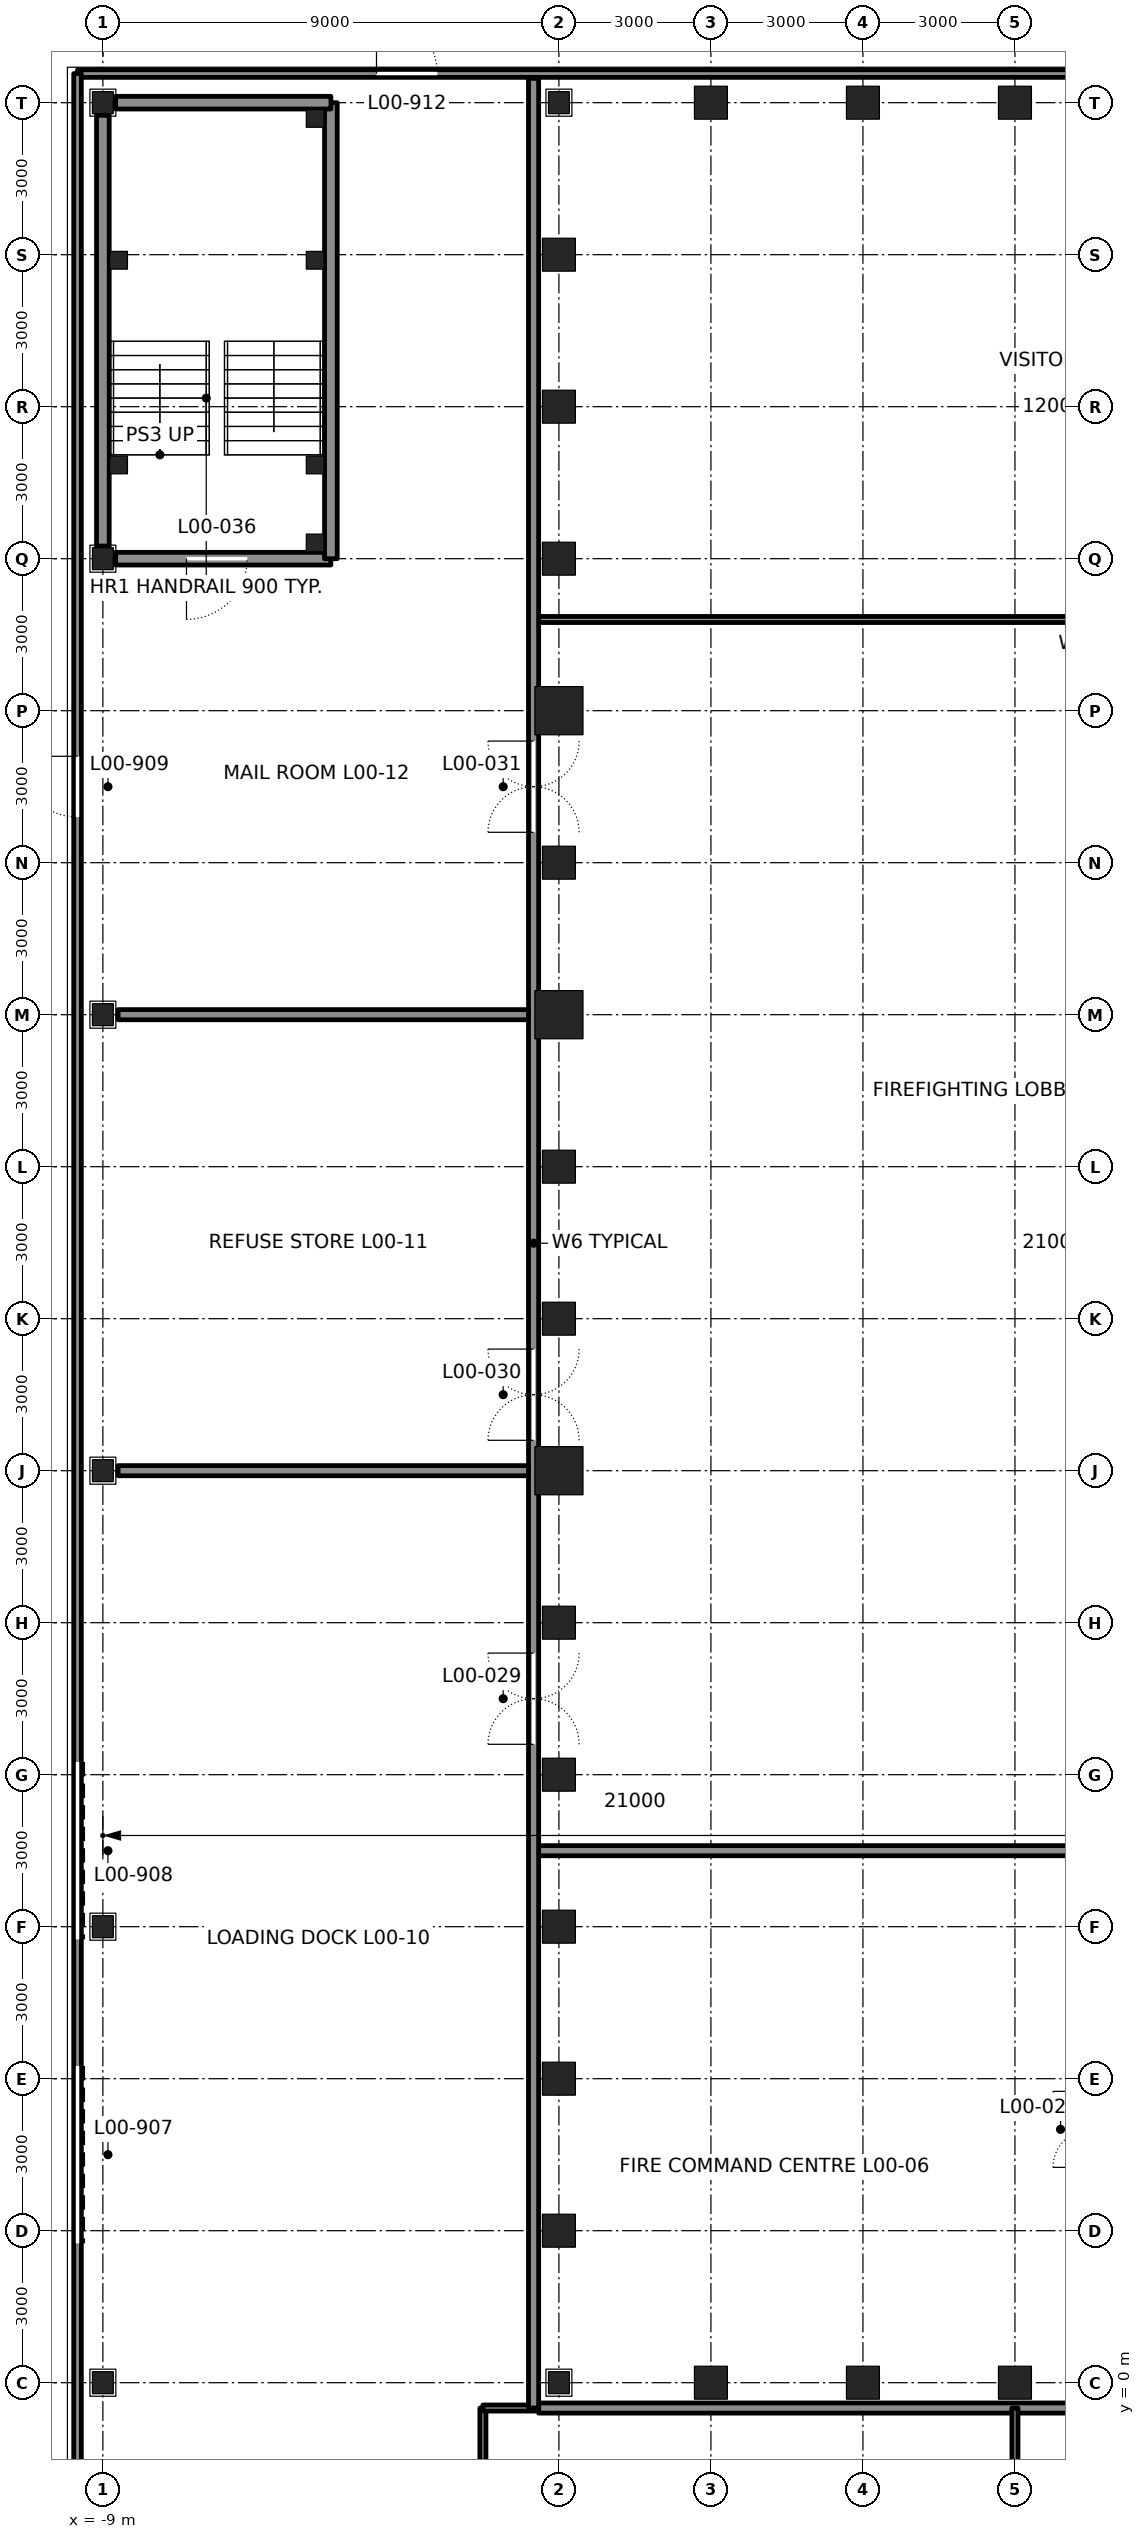
"""IFC4 building model, lengths in metres.
Left out: names, types, materials, properties, quantities, classifications, styles, units other than length and angle.
Written with IfcOpenShell. Run it as: python <this file> out.ifc"""

import sys

from ifc_helpers import new_model, si_unit, direction, frame, frame_2d, origin, origin_2d, place, context, subcontext, project, spatial, rectangle, hollow_rectangle, i_section, extrude, element, fill, save


model = new_model("IFC4")
c1 = context("Model", 3, precision=1e-05, world=origin(), true_north=direction((0.0, 1.0)))
c2 = subcontext(c1, "Body", "Model", "MODEL_VIEW")
j1 = project(units=[si_unit("LENGTHUNIT", "METRE"), si_unit("PLANEANGLEUNIT", "RADIAN")], contexts=[c1])
p1 = place(None, origin())
s1 = spatial("IfcSite", under=j1, at=p1, CompositionType="ELEMENT")
p2 = place(p1, origin())
s2 = spatial("IfcBuilding", under=s1, at=p2, CompositionType="ELEMENT")
p3 = place(p2, origin())
s3 = spatial("IfcBuildingStorey", under=s2, at=p3, CompositionType="ELEMENT", Elevation=0.0)
for number, where, z_axis, x_axis in (
    (1, (3.0, 0.0, 0.0), (0.0, 0.0, 1.0), (0.0, -1.0, 0.0)),
    (2, (6.0, 0.0, 0.0), (0.0, 0.0, 1.0), (0.0, -1.0, 0.0)),
    (3, (9.0, 0.0, 0.0), (0.0, 0.0, 1.0), (0.0, -1.0, 0.0)),
    (4, (9.0, 45.0, 0.0), (0.0, 0.0, 1.0), (0.0, 1.0, 0.0)),
    (5, (6.0, 45.0, 0.0), (0.0, 0.0, 1.0), (0.0, 1.0, 0.0)),
    (6, (3.0, 45.0, 0.0), (0.0, 0.0, 1.0), (0.0, 1.0, 0.0)),
    (7, (0.0, 42.0, 0.0), (0.0, 0.0, 1.0), (-1.0, 0.0, 0.0)),
    (8, (0.0, 39.0, 0.0), (0.0, 0.0, 1.0), (-1.0, 0.0, 0.0)),
    (9, (0.0, 36.0, 0.0), (0.0, 0.0, 1.0), (-1.0, 0.0, 0.0)),
):
    element("IfcColumn", number, at=place(p3, frame(where, z_axis=z_axis, x_axis=x_axis)), inside=s3, PredefinedType="COLUMN", context=c2, shape_type="SweptSolid", body=[
        extrude(hollow_rectangle(XDim=0.65, YDim=0.65, WallThickness=0.065, at=origin_2d()), origin(), (0.0, 0.0, 1.0), 6.0),
    ])
p4 = place(p3, frame((0.0, 33.0, 0.0), z_axis=(0.0, 0.0, 1.0), x_axis=(-1.0, 0.0, 0.0)))
e10 = element("IfcColumn", 10, at=p4, inside=s3, PredefinedType="COLUMN", context=c2, shape_type="SweptSolid", body=[
    extrude(hollow_rectangle(XDim=0.95, YDim=0.95, WallThickness=0.11, at=origin_2d()), origin(), (0.0, 0.0, 1.0), 6.0),
])
p5 = place(p3, frame((0.0, 30.0, 0.0), z_axis=(0.0, 0.0, 1.0), x_axis=(-1.0, 0.0, 0.0)))
e11 = element("IfcColumn", 11, at=p5, inside=s3, PredefinedType="COLUMN", context=c2, shape_type="SweptSolid", body=[
    extrude(hollow_rectangle(XDim=0.65, YDim=0.65, WallThickness=0.065, at=origin_2d()), origin(), (0.0, 0.0, 1.0), 6.0),
])
p6 = place(p3, frame((0.0, 27.0, 0.0), z_axis=(0.0, 0.0, 1.0), x_axis=(-1.0, 0.0, 0.0)))
e12 = element("IfcColumn", 12, at=p6, inside=s3, PredefinedType="COLUMN", context=c2, shape_type="SweptSolid", body=[
    extrude(hollow_rectangle(XDim=0.95, YDim=0.95, WallThickness=0.11, at=origin_2d()), origin(), (0.0, 0.0, 1.0), 6.0),
])
for number, where, z_axis, x_axis in (
    (13, (0.0, 24.0, 0.0), (0.0, 0.0, 1.0), (-1.0, 0.0, 0.0)),
    (14, (0.0, 21.0, 0.0), (0.0, 0.0, 1.0), (-1.0, 0.0, 0.0)),
):
    element("IfcColumn", number, at=place(p3, frame(where, z_axis=z_axis, x_axis=x_axis)), inside=s3, PredefinedType="COLUMN", context=c2, shape_type="SweptSolid", body=[
        extrude(hollow_rectangle(XDim=0.65, YDim=0.65, WallThickness=0.065, at=origin_2d()), origin(), (0.0, 0.0, 1.0), 6.0),
    ])
p7 = place(p3, frame((0.0, 18.0, 0.0), z_axis=(0.0, 0.0, 1.0), x_axis=(-1.0, 0.0, 0.0)))
e15 = element("IfcColumn", 15, at=p7, inside=s3, PredefinedType="COLUMN", context=c2, shape_type="SweptSolid", body=[
    extrude(hollow_rectangle(XDim=0.95, YDim=0.95, WallThickness=0.11, at=origin_2d()), origin(), (0.0, 0.0, 1.0), 6.0),
])
for number, where, z_axis, x_axis in (
    (16, (0.0, 15.0, 0.0), (0.0, 0.0, 1.0), (-1.0, 0.0, 0.0)),
    (17, (0.0, 12.0, 0.0), (0.0, 0.0, 1.0), (-1.0, 0.0, 0.0)),
    (18, (0.0, 9.0, 0.0), (0.0, 0.0, 1.0), (-1.0, 0.0, 0.0)),
    (19, (0.0, 6.0, 0.0), (0.0, 0.0, 1.0), (-1.0, 0.0, 0.0)),
    (20, (0.0, 3.0, 0.0), (0.0, 0.0, 1.0), (-1.0, 0.0, 0.0)),
):
    element("IfcColumn", number, at=place(p3, frame(where, z_axis=z_axis, x_axis=x_axis)), inside=s3, PredefinedType="COLUMN", context=c2, shape_type="SweptSolid", body=[
        extrude(hollow_rectangle(XDim=0.65, YDim=0.65, WallThickness=0.065, at=origin_2d()), origin(), (0.0, 0.0, 1.0), 6.0),
    ])
for number, where, z_axis, x_axis in (
    (21, (-9.0, 0.0, 0.0), (0.0, 0.0, 1.0), (1.0, 0.0, 0.0)),
    (22, (-9.0, 9.0, 0.0), (0.0, 0.0, 1.0), (1.0, 0.0, 0.0)),
    (23, (-9.0, 18.0, 0.0), (0.0, 0.0, 1.0), (1.0, 0.0, 0.0)),
    (24, (-9.0, 27.0, 0.0), (0.0, 0.0, 1.0), (1.0, 0.0, 0.0)),
    (25, (-9.0, 36.0, 0.0), (0.0, 0.0, 1.0), (1.0, 0.0, 0.0)),
    (26, (-9.0, 45.0, 0.0), (0.0, 0.0, 1.0), (1.0, 0.0, 0.0)),
    (27, (0.0, 0.0, 0.0), (0.0, 0.0, 1.0), (1.0, 0.0, 0.0)),
    (28, (0.0, 45.0, 0.0), (0.0, 0.0, 1.0), (1.0, 0.0, 0.0)),
):
    element("IfcColumn", number, at=place(p3, frame(where, z_axis=z_axis, x_axis=x_axis)), inside=s3, PredefinedType="COLUMN", context=c2, shape_type="SweptSolid", body=[
        extrude(i_section(OverallWidth=0.411, OverallDepth=0.434, WebThickness=0.036, FlangeThickness=0.057, at=origin_2d()), origin(), (0.0, 0.0, 1.0), 6.0),
    ])
p8 = place(p3, frame((54.5, 45.575, 0.0), z_axis=(0.0, 0.0, 1.0), x_axis=(-1.0, 0.0, 0.0)))
e29 = element("IfcWall", 29, at=p8, inside=s3, PredefinedType="SOLIDWALL", context=c2, shape_type="SweptSolid", body=[
    extrude(rectangle(XDim=64.0, YDim=0.15, at=frame_2d((32.0, 0.0))), origin(), (0.0, 0.0, 1.0), 5.8),
])
p9 = place(p8, frame((56.9, 0.0, 0.0)))
e30 = element("IfcOpeningElement", 30, at=p9, cuts=e29, PredefinedType="OPENING", context=c2, shape_type="SweptSolid", body=[
    extrude(rectangle(XDim=1.2, YDim=2.1, at=frame_2d((0.6, 1.05))), frame((0.0, 0.085, 0.0), z_axis=(0.0, -1.0, 0.0), x_axis=(1.0, 0.0, 0.0)), (0.0, 0.0, 1.0), 0.17),
])
p10 = place(p8, frame((5.9, 0.0, 0.0)))
e31 = element("IfcOpeningElement", 31, at=p10, cuts=e29, PredefinedType="OPENING", context=c2, shape_type="SweptSolid", body=[
    extrude(rectangle(XDim=1.2, YDim=2.1, at=frame_2d((0.6, 1.05))), frame((0.0, 0.085, 0.0), z_axis=(0.0, -1.0, 0.0), x_axis=(1.0, 0.0, 0.0)), (0.0, 0.0, 1.0), 0.17),
])
p11 = place(p3, frame((-9.5, 45.575, 0.0), z_axis=(0.0, 0.0, 1.0), x_axis=(0.0, -1.0, 0.0)))
e32 = element("IfcWall", 32, at=p11, inside=s3, PredefinedType="SOLIDWALL", context=c2, shape_type="SweptSolid", body=[
    extrude(rectangle(XDim=64.075, YDim=0.15, at=frame_2d((32.038, 0.0))), origin(), (0.0, 0.0, 1.0), 5.8),
])
p12 = place(p11, frame((39.325, 0.0, 0.0)))
e33 = element("IfcOpeningElement", 33, at=p12, cuts=e32, PredefinedType="OPENING", context=c2, shape_type="SweptSolid", body=[
    extrude(rectangle(XDim=3.5, YDim=4.0, at=frame_2d((1.75, 2.0))), frame((0.0, 0.085, 0.0), z_axis=(0.0, -1.0, 0.0), x_axis=(1.0, 0.0, 0.0)), (0.0, 0.0, 1.0), 0.17),
])
p13 = place(p11, frame((33.325, 0.0, 0.0)))
e34 = element("IfcOpeningElement", 34, at=p13, cuts=e32, PredefinedType="OPENING", context=c2, shape_type="SweptSolid", body=[
    extrude(rectangle(XDim=3.5, YDim=4.0, at=frame_2d((1.75, 2.0))), frame((0.0, 0.085, 0.0), z_axis=(0.0, -1.0, 0.0), x_axis=(1.0, 0.0, 0.0)), (0.0, 0.0, 1.0), 0.17),
])
p14 = place(p11, frame((13.475, 0.0, 0.0)))
e35 = element("IfcOpeningElement", 35, at=p14, cuts=e32, PredefinedType="OPENING", context=c2, shape_type="SweptSolid", body=[
    extrude(rectangle(XDim=1.2, YDim=2.1, at=frame_2d((0.6, 1.05))), frame((0.0, 0.085, 0.0), z_axis=(0.0, -1.0, 0.0), x_axis=(1.0, 0.0, 0.0)), (0.0, 0.0, 1.0), 0.17),
])
for number, where, z_axis, x_axis in (
    (36, (-0.4, 10.5, 0.0), (0.0, 0.0, 1.0), (1.0, 0.0, 0.0)),
    (37, (-0.4, -0.5, 0.0), (0.0, 0.0, 1.0), (1.0, 0.0, 0.0)),
):
    element("IfcWall", number, at=place(p3, frame(where, z_axis=z_axis, x_axis=x_axis)), inside=s3, PredefinedType="SOLIDWALL", context=c2, shape_type="SweptSolid", body=[
        extrude(rectangle(XDim=10.9, YDim=0.2, at=frame_2d((5.45, 0.0))), origin(), (0.0, 0.0, 1.0), 5.8),
    ])
p15 = place(p3, frame((-0.5, 34.8, 0.0), z_axis=(0.0, 0.0, 1.0), x_axis=(1.0, 0.0, 0.0)))
e38 = element("IfcWall", 38, at=p15, inside=s3, PredefinedType="PARTITIONING", context=c2, shape_type="SweptSolid", body=[
    extrude(rectangle(XDim=23.0, YDim=0.12, at=frame_2d((11.5, 0.0))), origin(), (0.0, 0.0, 1.0), 5.8),
])
p16 = place(p15, frame((11.0, 0.0, 0.0)))
e39 = element("IfcOpeningElement", 39, at=p16, cuts=e38, PredefinedType="OPENING", context=c2, shape_type="SweptSolid", body=[
    extrude(rectangle(XDim=1.0, YDim=2.4, at=frame_2d((0.5, 1.2))), frame((0.0, 0.07, 0.0), z_axis=(0.0, -1.0, 0.0), x_axis=(1.0, 0.0, 0.0)), (0.0, 0.0, 1.0), 0.14),
])
p17 = place(p3, frame((9.0, -18.0, 0.0), z_axis=(0.0, 0.0, 1.0), x_axis=(0.0, 1.0, 0.0)))
e40 = element("IfcWall", 40, at=p17, inside=s3, PredefinedType="PARTITIONING", context=c2, shape_type="SweptSolid", body=[
    extrude(rectangle(XDim=17.5, YDim=0.12, at=frame_2d((8.75, 0.0))), origin(), (0.0, 0.0, 1.0), 4.853),
])
p18 = place(p17, frame((10.875, 0.0, 0.0)))
e41 = element("IfcOpeningElement", 41, at=p18, cuts=e40, PredefinedType="OPENING", context=c2, shape_type="SweptSolid", body=[
    extrude(rectangle(XDim=1.0, YDim=2.4, at=frame_2d((0.5, 1.2))), frame((0.0, 0.07, 0.0), z_axis=(0.0, -1.0, 0.0), x_axis=(1.0, 0.0, 0.0)), (0.0, 0.0, 1.0), 0.14),
])
p19 = place(p3, frame((-1.5, -18.405, 0.0), z_axis=(0.0, 0.0, 1.0), x_axis=(0.0, 1.0, 0.0)))
e42 = element("IfcWall", 42, at=p19, inside=s3, PredefinedType="PARTITIONING", context=c2, shape_type="SweptSolid", body=[
    extrude(rectangle(XDim=17.905, YDim=0.12, at=frame_2d((8.953, 0.0))), origin(), (0.0, 0.0, 1.0), 5.8),
])
p20 = place(p3, frame((-1.5, -0.5, 0.0), z_axis=(0.0, 0.0, 1.0), x_axis=(1.0, 0.0, 0.0)))
e43 = element("IfcWall", 43, at=p20, inside=s3, PredefinedType="PARTITIONING", context=c2, shape_type="SweptSolid", body=[
    extrude(rectangle(XDim=1.1, YDim=0.12, at=frame_2d((0.55, 0.0))), origin(), (0.0, 0.0, 1.0), 5.8),
])
p21 = place(p3, frame((-0.5, -0.5, 0.0), z_axis=(0.0, 0.0, 1.0), x_axis=(0.0, 1.0, 0.0)))
e44 = element("IfcWall", 44, at=p21, inside=s3, PredefinedType="PARTITIONING", context=c2, shape_type="SweptSolid", body=[
    extrude(rectangle(XDim=45.98, YDim=0.2, at=frame_2d((22.99, 0.0))), origin(), (0.0, 0.0, 1.0), 5.8),
])
p22 = place(p21, frame((13.1, 0.0, 0.0)))
e45 = element("IfcOpeningElement", 45, at=p22, cuts=e44, PredefinedType="OPENING", context=c2, shape_type="SweptSolid", body=[
    extrude(rectangle(XDim=1.8, YDim=2.4, at=frame_2d((0.9, 1.2))), frame((0.0, 0.11, 0.0), z_axis=(0.0, -1.0, 0.0), x_axis=(1.0, 0.0, 0.0)), (0.0, 0.0, 1.0), 0.22),
])
p23 = place(p21, frame((19.1, 0.0, 0.0)))
e46 = element("IfcOpeningElement", 46, at=p23, cuts=e44, PredefinedType="OPENING", context=c2, shape_type="SweptSolid", body=[
    extrude(rectangle(XDim=1.8, YDim=2.4, at=frame_2d((0.9, 1.2))), frame((0.0, 0.11, 0.0), z_axis=(0.0, -1.0, 0.0), x_axis=(1.0, 0.0, 0.0)), (0.0, 0.0, 1.0), 0.22),
])
p24 = place(p21, frame((31.1, 0.0, 0.0)))
e47 = element("IfcOpeningElement", 47, at=p24, cuts=e44, PredefinedType="OPENING", context=c2, shape_type="SweptSolid", body=[
    extrude(rectangle(XDim=1.8, YDim=2.4, at=frame_2d((0.9, 1.2))), frame((0.0, 0.11, 0.0), z_axis=(0.0, -1.0, 0.0), x_axis=(1.0, 0.0, 0.0)), (0.0, 0.0, 1.0), 0.22),
])
for number, where, z_axis, x_axis in (
    (48, (-8.7, 18.0, 0.0), (0.0, 0.0, 1.0), (1.0, 0.0, 0.0)),
    (49, (-8.7, 27.0, 0.0), (0.0, 0.0, 1.0), (1.0, 0.0, 0.0)),
):
    element("IfcWall", number, at=place(p3, frame(where, z_axis=z_axis, x_axis=x_axis)), inside=s3, PredefinedType="PARTITIONING", context=c2, shape_type="SweptSolid", body=[
        extrude(rectangle(XDim=8.1, YDim=0.2, at=frame_2d((4.05, 0.0))), origin(), (0.0, 0.0, 1.0), 4.853),
    ])
p25 = place(p3, frame((-8.75, 36.0, 0.0), z_axis=(0.0, 0.0, 1.0), x_axis=(1.0, 0.0, 0.0)))
e50 = element("IfcWall", 50, at=p25, inside=s3, PredefinedType="SOLIDWALL", context=c2, shape_type="SweptSolid", body=[
    extrude(rectangle(XDim=4.25, YDim=0.25, at=frame_2d((2.125, 0.0))), origin(), (0.0, 0.0, 1.0), 4.853),
])
p26 = place(p25, frame((1.4, 0.0, 0.0)))
e51 = element("IfcOpeningElement", 51, at=p26, cuts=e50, PredefinedType="OPENING", context=c2, shape_type="SweptSolid", body=[
    extrude(rectangle(XDim=1.2, YDim=2.1, at=frame_2d((0.6, 1.05))), frame((0.0, 0.135, 0.0), z_axis=(0.0, -1.0, 0.0), x_axis=(1.0, 0.0, 0.0)), (0.0, 0.0, 1.0), 0.27),
])
p27 = place(p3, frame((-4.5, 36.0, 0.0), z_axis=(0.0, 0.0, 1.0), x_axis=(0.0, 1.0, 0.0)))
e52 = element("IfcWall", 52, at=p27, inside=s3, PredefinedType="SOLIDWALL", context=c2, shape_type="SweptSolid", body=[
    extrude(rectangle(XDim=9.0, YDim=0.25, at=frame_2d((4.5, 0.0))), origin(), (0.0, 0.0, 1.0), 4.853),
])
p28 = place(p3, frame((-8.75, 45.0, 0.0), z_axis=(0.0, 0.0, 1.0), x_axis=(1.0, 0.0, 0.0)))
e53 = element("IfcWall", 53, at=p28, inside=s3, PredefinedType="SOLIDWALL", context=c2, shape_type="SweptSolid", body=[
    extrude(rectangle(XDim=4.25, YDim=0.25, at=frame_2d((2.125, 0.0))), origin(), (0.0, 0.0, 1.0), 4.853),
])
p29 = place(p3, frame((-9.0, 36.25, 0.0), z_axis=(0.0, 0.0, 1.0), x_axis=(0.0, 1.0, 0.0)))
e54 = element("IfcWall", 54, at=p29, inside=s3, PredefinedType="SOLIDWALL", context=c2, shape_type="SweptSolid", body=[
    extrude(rectangle(XDim=8.5, YDim=0.25, at=frame_2d((4.25, 0.0))), origin(), (0.0, 0.0, 1.0), 4.853),
])
for number, where, z_axis, x_axis in (
    (55, (-4.81, 44.69, 0.0), (0.0, 0.0, 1.0), (1.0, 0.0, 0.0)),
    (56, (-8.69, 41.89, 0.0), (0.0, 0.0, 1.0), (1.0, 0.0, 0.0)),
    (57, (-4.81, 41.89, 0.0), (0.0, 0.0, 1.0), (1.0, 0.0, 0.0)),
    (58, (-8.69, 37.85, 0.0), (0.0, 0.0, 1.0), (1.0, 0.0, 0.0)),
    (59, (-4.81, 37.85, 0.0), (0.0, 0.0, 1.0), (1.0, 0.0, 0.0)),
    (60, (-4.81, 36.31, 0.0), (0.0, 0.0, 1.0), (1.0, 0.0, 0.0)),
):
    element("IfcColumn", number, at=place(p3, frame(where, z_axis=z_axis, x_axis=x_axis)), inside=s3, PredefinedType="COLUMN", context=c2, shape_type="SweptSolid", body=[
        extrude(hollow_rectangle(XDim=0.35, YDim=0.35, WallThickness=0.035, at=origin_2d()), origin(), (0.0, 0.0, 1.0), 6.0),
    ])
p30 = place(p12, origin())
e61 = element("IfcDoor", 61, at=p30, inside=s3, OperationType="ROLLINGUP", PredefinedType="DOOR", context=c2, shape_type="SweptSolid", body=[
    extrude(rectangle(XDim=3.5, YDim=4.0, at=frame_2d((1.75, 2.0))), frame((0.0, 0.025, 0.0), z_axis=(0.0, -1.0, 0.0), x_axis=(1.0, 0.0, 0.0)), (0.0, 0.0, 1.0), 0.05),
])
fill(e33, e61)
p31 = place(p13, origin())
e62 = element("IfcDoor", 62, at=p31, inside=s3, OperationType="ROLLINGUP", PredefinedType="DOOR", context=c2, shape_type="SweptSolid", body=[
    extrude(rectangle(XDim=3.5, YDim=4.0, at=frame_2d((1.75, 2.0))), frame((0.0, 0.025, 0.0), z_axis=(0.0, -1.0, 0.0), x_axis=(1.0, 0.0, 0.0)), (0.0, 0.0, 1.0), 0.05),
])
fill(e34, e62)
p32 = place(p14, frame((1.2, 0.0, 0.0), z_axis=(0.0, 0.0, 1.0), x_axis=(-1.0, 0.0, 0.0)))
e63 = element("IfcDoor", 63, at=p32, inside=s3, OperationType="SINGLE_SWING_RIGHT", PredefinedType="DOOR", context=c2, shape_type="SweptSolid", body=[
    extrude(rectangle(XDim=1.2, YDim=2.1, at=frame_2d((0.6, 1.05))), frame((0.0, 0.025, 0.0), z_axis=(0.0, -1.0, 0.0), x_axis=(1.0, 0.0, 0.0)), (0.0, 0.0, 1.0), 0.05),
])
fill(e35, e63)
p33 = place(p9, frame((1.2, 0.0, 0.0), z_axis=(0.0, 0.0, 1.0), x_axis=(-1.0, 0.0, 0.0)))
e64 = element("IfcDoor", 64, at=p33, inside=s3, OperationType="SINGLE_SWING_LEFT", PredefinedType="DOOR", context=c2, shape_type="SweptSolid", body=[
    extrude(rectangle(XDim=1.2, YDim=2.1, at=frame_2d((0.6, 1.05))), frame((0.0, 0.025, 0.0), z_axis=(0.0, -1.0, 0.0), x_axis=(1.0, 0.0, 0.0)), (0.0, 0.0, 1.0), 0.05),
])
fill(e30, e64)
p34 = place(p22, origin())
e65 = element("IfcDoor", 65, at=p34, inside=s3, OperationType="DOUBLE_DOOR_DOUBLE_SWING", PredefinedType="DOOR", context=c2, shape_type="SweptSolid", body=[
    extrude(rectangle(XDim=1.8, YDim=2.4, at=frame_2d((0.9, 1.2))), frame((0.0, 0.025, 0.0), z_axis=(0.0, -1.0, 0.0), x_axis=(1.0, 0.0, 0.0)), (0.0, 0.0, 1.0), 0.05),
])
fill(e45, e65)
p35 = place(p23, origin())
e66 = element("IfcDoor", 66, at=p35, inside=s3, OperationType="DOUBLE_DOOR_DOUBLE_SWING", PredefinedType="DOOR", context=c2, shape_type="SweptSolid", body=[
    extrude(rectangle(XDim=1.8, YDim=2.4, at=frame_2d((0.9, 1.2))), frame((0.0, 0.025, 0.0), z_axis=(0.0, -1.0, 0.0), x_axis=(1.0, 0.0, 0.0)), (0.0, 0.0, 1.0), 0.05),
])
fill(e46, e66)
p36 = place(p24, origin())
e67 = element("IfcDoor", 67, at=p36, inside=s3, OperationType="DOUBLE_DOOR_DOUBLE_SWING", PredefinedType="DOOR", context=c2, shape_type="SweptSolid", body=[
    extrude(rectangle(XDim=1.8, YDim=2.4, at=frame_2d((0.9, 1.2))), frame((0.0, 0.025, 0.0), z_axis=(0.0, -1.0, 0.0), x_axis=(1.0, 0.0, 0.0)), (0.0, 0.0, 1.0), 0.05),
])
fill(e47, e67)
p37 = place(p26, frame((1.2, 0.0, 0.0), z_axis=(0.0, 0.0, 1.0), x_axis=(-1.0, 0.0, 0.0)))
e68 = element("IfcDoor", 68, at=p37, inside=s3, OperationType="SINGLE_SWING_RIGHT", PredefinedType="DOOR", context=c2, shape_type="SweptSolid", body=[
    extrude(rectangle(XDim=1.2, YDim=2.1, at=frame_2d((0.6, 1.05))), frame((0.0, 0.025, 0.0), z_axis=(0.0, -1.0, 0.0), x_axis=(1.0, 0.0, 0.0)), (0.0, 0.0, 1.0), 0.05),
])
fill(e51, e68)
save(model, sys.argv[1])
